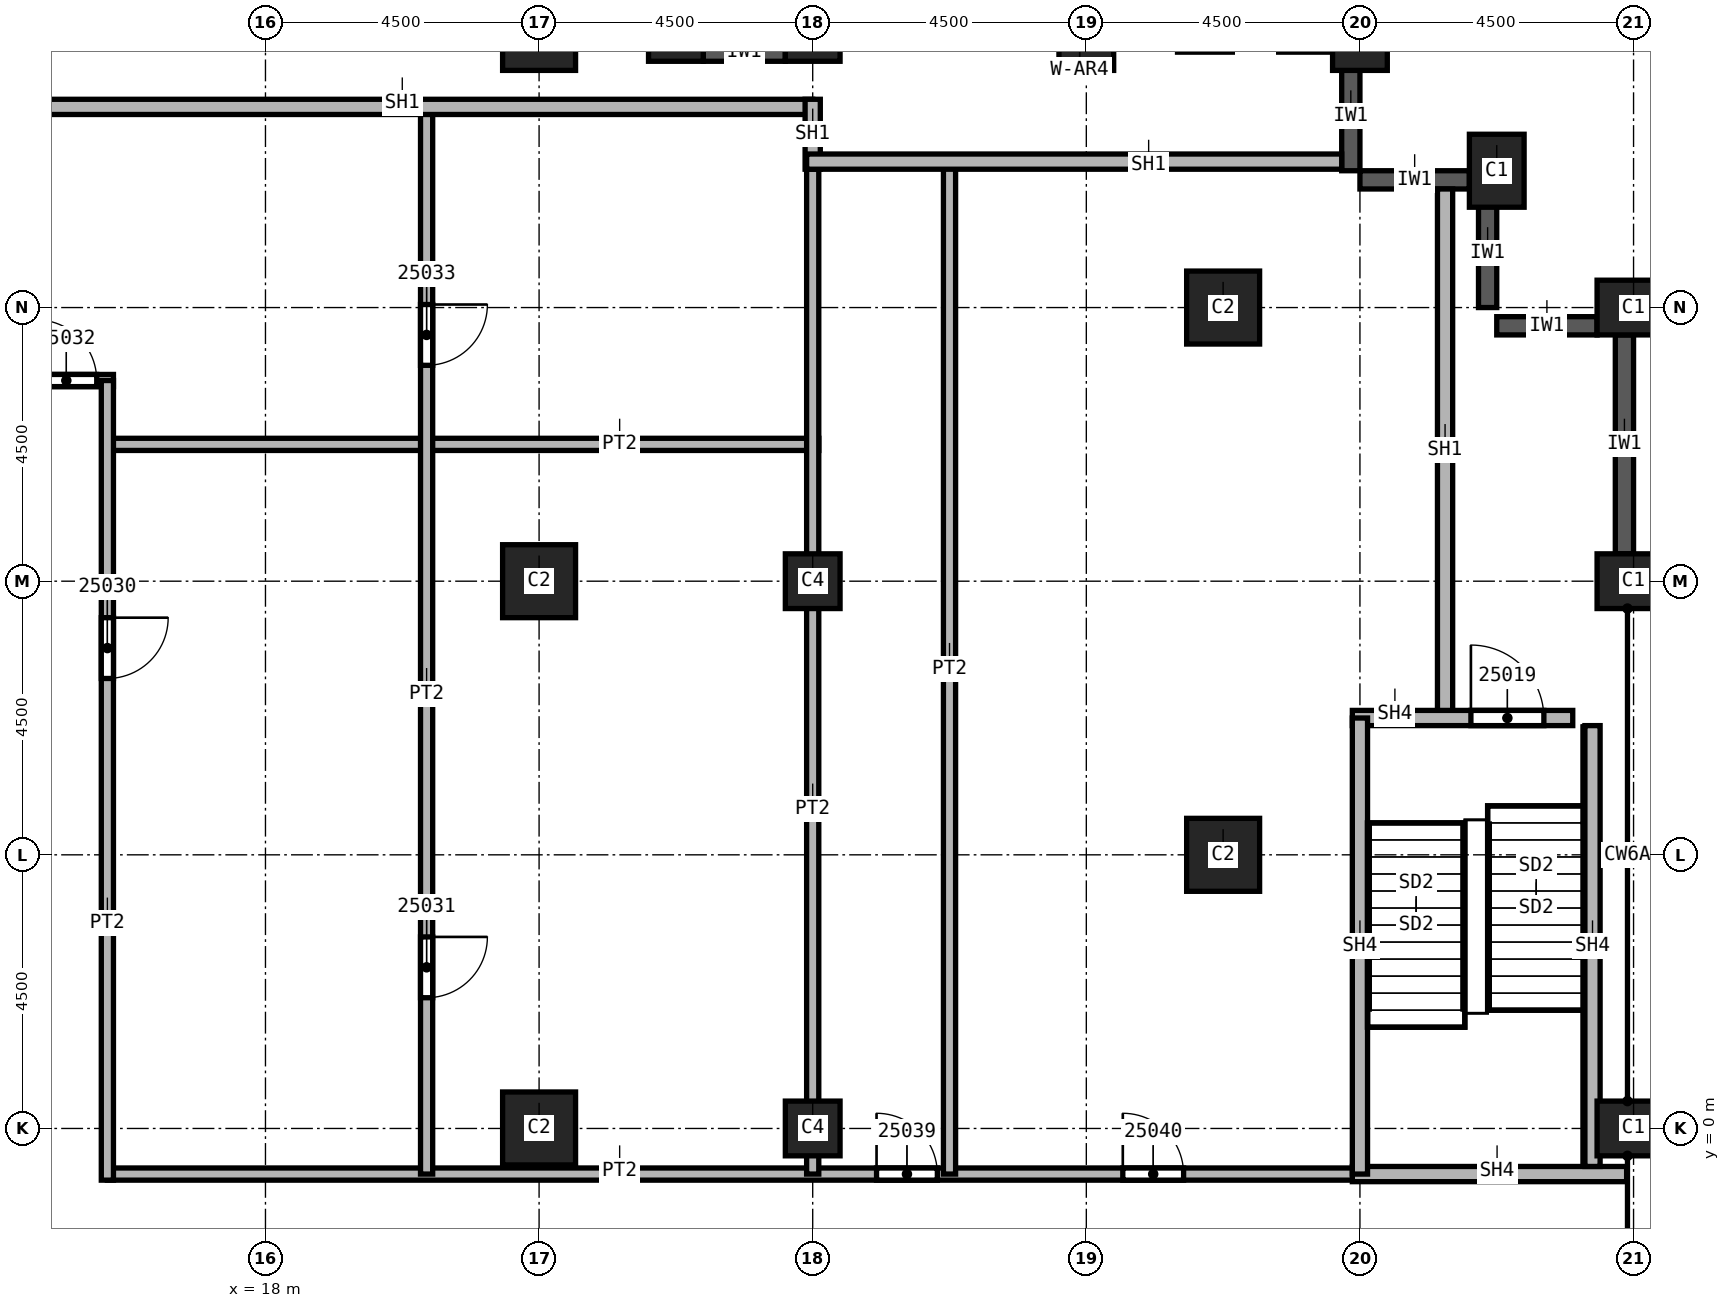
"""IFC4 building model, lengths in metres.
Left out: names, types, materials, properties, quantities, classifications, styles, units other than length and angle.
Written with IfcOpenShell. Run it as: python <this file> out.ifc"""

import sys

from ifc_helpers import new_model, si_unit, direction, frame, frame_2d, origin, origin_2d, place, context, subcontext, project, spatial, rectangle, extrude, element, fill, save


model = new_model("IFC4")
c1 = context("Model", 3, precision=1e-05, world=origin(), true_north=direction((0.0, 1.0)))
c2 = subcontext(c1, "Body", "Model", "MODEL_VIEW")
j1 = project(units=[si_unit("LENGTHUNIT", "METRE"), si_unit("PLANEANGLEUNIT", "RADIAN")], contexts=[c1])
p1 = place(None, origin())
s1 = spatial("IfcSite", under=j1, at=p1, CompositionType="ELEMENT")
p2 = place(p1, origin())
s2 = spatial("IfcBuilding", under=s1, at=p2, CompositionType="ELEMENT")
p3 = place(p2, frame((0.0, 0.0, 60.0)))
s3 = spatial("IfcBuildingStorey", under=s2, at=p3, CompositionType="ELEMENT", Elevation=60.0)
for number, where, z_axis, x_axis in (
    (1, (40.5, 0.0, 0.0), (0.0, 0.0, 1.0), (0.0, 1.0, 0.0)),
    (2, (40.5, 9.0, 0.0), (0.0, 0.0, 1.0), (0.0, 1.0, 0.0)),
    (3, (40.5, 13.5, 0.0), (0.0, 0.0, 1.0), (0.0, 1.0, 0.0)),
    (4, (38.25, 15.75, 0.0), (0.0, 0.0, 1.0), (1.0, 0.0, 0.0)),
    (5, (31.5, 18.0, 0.0), (0.0, 0.0, 1.0), (1.0, 0.0, 0.0)),
    (6, (36.0, 18.0, 0.0), (0.0, 0.0, 1.0), (1.0, 0.0, 0.0)),
):
    element("IfcColumn", number, at=place(p3, frame(where, z_axis=z_axis, x_axis=x_axis)), inside=s3, PredefinedType="COLUMN", context=c2, shape_type="SweptSolid", body=[
        extrude(rectangle(XDim=0.9, YDim=1.2, at=origin_2d()), origin(), (0.0, 0.0, 1.0), 7.7),
    ])
for number, where, z_axis, x_axis in (
    (7, (33.75, 4.5, 0.0), (0.0, 0.0, 1.0), (1.0, 0.0, 0.0)),
    (8, (33.75, 13.5, 0.0), (0.0, 0.0, 1.0), (1.0, 0.0, 0.0)),
    (9, (22.5, 0.0, 0.0), (0.0, 0.0, 1.0), (1.0, 0.0, 0.0)),
    (10, (22.5, 9.0, 0.0), (0.0, 0.0, 1.0), (1.0, 0.0, 0.0)),
    (11, (22.5, 18.0, 0.0), (0.0, 0.0, 1.0), (1.0, 0.0, 0.0)),
):
    element("IfcColumn", number, at=place(p3, frame(where, z_axis=z_axis, x_axis=x_axis)), inside=s3, PredefinedType="COLUMN", context=c2, shape_type="SweptSolid", body=[
        extrude(rectangle(XDim=1.2, YDim=1.2, at=origin_2d()), origin(), (0.0, 0.0, 1.0), 7.7),
    ])
for number, where, z_axis, x_axis in (
    (12, (27.0, 0.0, 0.0), (0.0, 0.0, 1.0), (1.0, 0.0, 0.0)),
    (13, (27.0, 9.0, 0.0), (0.0, 0.0, 1.0), (1.0, 0.0, 0.0)),
    (14, (27.0, 18.0, 0.0), (0.0, 0.0, 1.0), (1.0, 0.0, 0.0)),
    (15, (24.75, 18.0, 0.0), (0.0, 0.0, 1.0), (1.0, 0.0, 0.0)),
):
    element("IfcColumn", number, at=place(p3, frame(where, z_axis=z_axis, x_axis=x_axis)), inside=s3, PredefinedType="COLUMN", context=c2, shape_type="SweptSolid", body=[
        extrude(rectangle(XDim=0.9, YDim=0.9, at=origin_2d()), origin(), (0.0, 0.0, 1.0), 7.7),
    ])
p4 = place(p3, frame((39.9, 13.2, 0.0), z_axis=(0.0, 0.0, 1.0), x_axis=(-1.0, 0.0, 0.0)))
e16 = element("IfcWall", 16, at=p4, inside=s3, PredefinedType="SOLIDWALL", context=c2, shape_type="SweptSolid", body=[
    extrude(rectangle(XDim=1.65, YDim=0.3, at=frame_2d((0.825, 0.0))), origin(), (0.0, 0.0, 1.0), 7.1),
])
for number, where, z_axis, x_axis in (
    (17, (38.1, 15.3, 0.0), (0.0, 0.0, 1.0), (0.0, -1.0, 0.0)),
    (18, (37.8, 15.6, 0.0), (0.0, 0.0, 1.0), (-1.0, 0.0, 0.0)),
    (19, (35.85, 17.55, 0.0), (0.0, 0.0, 1.0), (0.0, -1.0, 0.0)),
):
    element("IfcWall", number, at=place(p3, frame(where, z_axis=z_axis, x_axis=x_axis)), inside=s3, PredefinedType="SOLIDWALL", context=c2, shape_type="SweptSolid", body=[
        extrude(rectangle(XDim=1.8, YDim=0.3, at=frame_2d((0.9, 0.0))), origin(), (0.0, 0.0, 1.0), 7.1),
    ])
p5 = place(p3, frame((40.35, 9.45, 0.0), z_axis=(0.0, 0.0, 1.0), x_axis=(0.0, 1.0, 0.0)))
e20 = element("IfcWall", 20, at=p5, inside=s3, PredefinedType="SOLIDWALL", context=c2, shape_type="SweptSolid", body=[
    extrude(rectangle(XDim=3.6, YDim=0.3, at=frame_2d((1.8, 0.0))), origin(), (0.0, 0.0, 1.0), 7.1),
])
p6 = place(p3, frame((26.55, 17.7, 0.0), z_axis=(0.0, 0.0, 1.0), x_axis=(-1.0, 0.0, 0.0)))
e21 = element("IfcWall", 21, at=p6, inside=s3, PredefinedType="SOLIDWALL", context=c2, shape_type="SweptSolid", body=[
    extrude(rectangle(XDim=1.35, YDim=0.3, at=frame_2d((0.675, 0.0))), origin(), (0.0, 0.0, 1.0), 7.1),
])
p7 = place(p3, frame((13.375, 12.3, 0.0), z_axis=(0.0, 0.0, 1.0), x_axis=(1.0, 0.0, 0.0)))
e22 = element("IfcWall", 22, at=p7, inside=s3, PredefinedType="PARTITIONING", context=c2, shape_type="SweptSolid", body=[
    extrude(rectangle(XDim=2.125, YDim=0.2, at=frame_2d((1.062, 0.0))), origin(), (0.0, 0.0, 1.0), 7.7),
])
p8 = place(p7, frame((0.85, 0.0, 0.0)))
e23 = element("IfcOpeningElement", 23, at=p8, cuts=e22, PredefinedType="OPENING", context=c2, shape_type="SweptSolid", body=[
    extrude(rectangle(XDim=1.0, YDim=2.1, at=frame_2d((0.5, 1.05))), frame((0.0, 0.1, 0.0), z_axis=(0.0, -1.0, 0.0), x_axis=(1.0, 0.0, 0.0)), (0.0, 0.0, 1.0), 0.2),
])
p9 = place(p3, frame((15.4, -0.75, 0.0), z_axis=(0.0, 0.0, 1.0), x_axis=(1.0, 0.0, 0.0)))
e24 = element("IfcWall", 24, at=p9, inside=s3, PredefinedType="PARTITIONING", context=c2, shape_type="SweptSolid", body=[
    extrude(rectangle(XDim=20.725, YDim=0.2, at=frame_2d((10.363, 0.0))), origin(), (0.0, 0.0, 1.0), 7.7),
])
p10 = place(p9, frame((12.65, 0.0, 0.0)))
e25 = element("IfcOpeningElement", 25, at=p10, cuts=e24, PredefinedType="OPENING", context=c2, shape_type="SweptSolid", body=[
    extrude(rectangle(XDim=1.0, YDim=2.1, at=frame_2d((0.5, 1.05))), frame((0.0, 0.1, 0.0), z_axis=(0.0, -1.0, 0.0), x_axis=(1.0, 0.0, 0.0)), (0.0, 0.0, 1.0), 0.2),
])
p11 = place(p9, frame((16.7, 0.0, 0.0)))
e26 = element("IfcOpeningElement", 26, at=p11, cuts=e24, PredefinedType="OPENING", context=c2, shape_type="SweptSolid", body=[
    extrude(rectangle(XDim=1.0, YDim=2.1, at=frame_2d((0.5, 1.05))), frame((0.0, 0.1, 0.0), z_axis=(0.0, -1.0, 0.0), x_axis=(1.0, 0.0, 0.0)), (0.0, 0.0, 1.0), 0.2),
])
p12 = place(p3, frame((15.4, 11.25, 0.0), z_axis=(0.0, 0.0, 1.0), x_axis=(1.0, 0.0, 0.0)))
e27 = element("IfcWall", 27, at=p12, inside=s3, PredefinedType="PARTITIONING", context=c2, shape_type="SweptSolid", body=[
    extrude(rectangle(XDim=11.7, YDim=0.2, at=frame_2d((5.85, 0.0))), origin(), (0.0, 0.0, 1.0), 7.7),
])
p13 = place(p3, frame((15.4, 12.3, 0.0), z_axis=(0.0, 0.0, 1.0), x_axis=(0.0, -1.0, 0.0)))
e28 = element("IfcWall", 28, at=p13, inside=s3, PredefinedType="PARTITIONING", context=c2, shape_type="SweptSolid", body=[
    extrude(rectangle(XDim=13.15, YDim=0.2, at=frame_2d((6.575, 0.0))), origin(), (0.0, 0.0, 1.0), 7.7),
])
p14 = place(p13, frame((3.9, 0.0, 0.0)))
e29 = element("IfcOpeningElement", 29, at=p14, cuts=e28, PredefinedType="OPENING", context=c2, shape_type="SweptSolid", body=[
    extrude(rectangle(XDim=1.0, YDim=2.1, at=frame_2d((0.5, 1.05))), frame((0.0, 0.1, 0.0), z_axis=(0.0, -1.0, 0.0), x_axis=(1.0, 0.0, 0.0)), (0.0, 0.0, 1.0), 0.2),
])
p15 = place(p3, frame((20.65, 16.8, 0.0), z_axis=(0.0, 0.0, 1.0), x_axis=(0.0, -1.0, 0.0)))
e30 = element("IfcWall", 30, at=p15, inside=s3, PredefinedType="PARTITIONING", context=c2, shape_type="SweptSolid", body=[
    extrude(rectangle(XDim=17.55, YDim=0.2, at=frame_2d((8.775, 0.0))), origin(), (0.0, 0.0, 1.0), 7.7),
])
p16 = place(p15, frame((13.65, 0.0, 0.0)))
e31 = element("IfcOpeningElement", 31, at=p16, cuts=e30, PredefinedType="OPENING", context=c2, shape_type="SweptSolid", body=[
    extrude(rectangle(XDim=1.0, YDim=2.1, at=frame_2d((0.5, 1.05))), frame((0.0, 0.1, 0.0), z_axis=(0.0, -1.0, 0.0), x_axis=(1.0, 0.0, 0.0)), (0.0, 0.0, 1.0), 0.2),
])
p17 = place(p15, frame((3.25, 0.0, 0.0)))
e32 = element("IfcOpeningElement", 32, at=p17, cuts=e30, PredefinedType="OPENING", context=c2, shape_type="SweptSolid", body=[
    extrude(rectangle(XDim=1.0, YDim=2.1, at=frame_2d((0.5, 1.05))), frame((0.0, 0.1, 0.0), z_axis=(0.0, -1.0, 0.0), x_axis=(1.0, 0.0, 0.0)), (0.0, 0.0, 1.0), 0.2),
])
for number, where, z_axis, x_axis in (
    (33, (27.0, 15.9, 0.0), (0.0, 0.0, 1.0), (0.0, -1.0, 0.0)),
    (34, (29.25, 15.9, 0.0), (0.0, 0.0, 1.0), (0.0, -1.0, 0.0)),
):
    element("IfcWall", number, at=place(p3, frame(where, z_axis=z_axis, x_axis=x_axis)), inside=s3, PredefinedType="PARTITIONING", context=c2, shape_type="SweptSolid", body=[
        extrude(rectangle(XDim=16.65, YDim=0.2, at=frame_2d((8.325, 0.0))), origin(), (0.0, 0.0, 1.0), 7.7),
    ])
p18 = place(p3, frame((27.0, 16.8, 0.0), z_axis=(0.0, 0.0, 1.0), x_axis=(-1.0, 0.0, 0.0)))
e35 = element("IfcWall", 35, at=p18, inside=s3, PredefinedType="SOLIDWALL", context=c2, shape_type="SweptSolid", body=[
    extrude(rectangle(XDim=13.5, YDim=0.25, at=frame_2d((6.75, 0.0))), origin(), (0.0, 0.0, 1.0), 7.7),
])
p19 = place(p3, frame((27.0, 15.775, 0.0), z_axis=(0.0, 0.0, 1.0), x_axis=(0.0, 1.0, 0.0)))
e36 = element("IfcWall", 36, at=p19, inside=s3, PredefinedType="SOLIDWALL", context=c2, shape_type="SweptSolid", body=[
    extrude(rectangle(XDim=1.15, YDim=0.25, at=frame_2d((0.575, 0.0))), origin(), (0.0, 0.0, 1.0), 7.7),
])
p20 = place(p3, frame((35.7, 15.9, 0.0), z_axis=(0.0, 0.0, 1.0), x_axis=(-1.0, 0.0, 0.0)))
e37 = element("IfcWall", 37, at=p20, inside=s3, PredefinedType="SOLIDWALL", context=c2, shape_type="SweptSolid", body=[
    extrude(rectangle(XDim=8.8, YDim=0.25, at=frame_2d((4.4, 0.0))), origin(), (0.0, 0.0, 1.0), 7.7),
])
p21 = place(p3, frame((37.4, 6.75, 0.0), z_axis=(0.0, 0.0, 1.0), x_axis=(0.0, 1.0, 0.0)))
e38 = element("IfcWall", 38, at=p21, inside=s3, PredefinedType="SOLIDWALL", context=c2, shape_type="SweptSolid", body=[
    extrude(rectangle(XDim=8.7, YDim=0.25, at=frame_2d((4.35, 0.0))), origin(), (0.0, 0.0, 1.0), 7.7),
])
p22 = place(p3, frame((35.875, -0.75, 0.0), z_axis=(0.0, 0.0, 1.0), x_axis=(1.0, 0.0, 0.0)))
e39 = element("IfcWall", 39, at=p22, inside=s3, PredefinedType="SOLIDWALL", context=c2, shape_type="SweptSolid", body=[
    extrude(rectangle(XDim=4.511, YDim=0.25, at=frame_2d((2.255, 0.0))), origin(), (0.0, 0.0, 1.0), 7.7),
])
p23 = place(p3, frame((35.875, 6.75, 0.0), z_axis=(0.0, 0.0, 1.0), x_axis=(1.0, 0.0, 0.0)))
e40 = element("IfcWall", 40, at=p23, inside=s3, PredefinedType="SOLIDWALL", context=c2, shape_type="SweptSolid", body=[
    extrude(rectangle(XDim=3.625, YDim=0.25, at=frame_2d((1.812, 0.0))), origin(), (0.0, 0.0, 1.0), 7.7),
])
p24 = place(p23, frame((1.95, 0.0, 0.0)))
e41 = element("IfcOpeningElement", 41, at=p24, cuts=e40, PredefinedType="OPENING", context=c2, shape_type="SweptSolid", body=[
    extrude(rectangle(XDim=1.2, YDim=2.1, at=frame_2d((0.6, 1.05))), frame((0.0, 0.125, 0.0), z_axis=(0.0, -1.0, 0.0), x_axis=(1.0, 0.0, 0.0)), (0.0, 0.0, 1.0), 0.25),
])
p25 = place(p3, frame((36.0, -0.75, 0.0), z_axis=(0.0, 0.0, 1.0), x_axis=(0.0, 1.0, 0.0)))
e42 = element("IfcWall", 42, at=p25, inside=s3, PredefinedType="SOLIDWALL", context=c2, shape_type="SweptSolid", body=[
    extrude(rectangle(XDim=7.5, YDim=0.25, at=frame_2d((3.75, 0.0))), origin(), (0.0, 0.0, 1.0), 7.7),
])
p26 = place(p3, frame((39.825, -0.625, 0.0), z_axis=(0.0, 0.0, 1.0), x_axis=(0.0, 1.0, 0.0)))
e43 = element("IfcWall", 43, at=p26, inside=s3, PredefinedType="SOLIDWALL", context=c2, shape_type="SweptSolid", body=[
    extrude(rectangle(XDim=7.25, YDim=0.25, at=frame_2d((3.625, 0.0))), origin(), (0.0, 0.0, 1.0), 7.7),
])
p27 = place(p24, origin())
e44 = element("IfcDoor", 44, at=p27, inside=s3, OperationType="SINGLE_SWING_RIGHT", PredefinedType="DOOR", context=c2, shape_type="SweptSolid", body=[
    extrude(rectangle(XDim=1.2, YDim=2.1, at=frame_2d((0.6, 1.05))), frame((0.0, 0.025, 0.0), z_axis=(0.0, -1.0, 0.0), x_axis=(1.0, 0.0, 0.0)), (0.0, 0.0, 1.0), 0.05),
])
fill(e41, e44)
p28 = place(p14, origin())
e45 = element("IfcDoor", 45, at=p28, inside=s3, OperationType="SINGLE_SWING_LEFT", PredefinedType="DOOR", context=c2, shape_type="SweptSolid", body=[
    extrude(rectangle(XDim=1.0, YDim=2.1, at=frame_2d((0.5, 1.05))), frame((0.0, 0.025, 0.0), z_axis=(0.0, -1.0, 0.0), x_axis=(1.0, 0.0, 0.0)), (0.0, 0.0, 1.0), 0.05),
])
fill(e29, e45)
p29 = place(p16, origin())
e46 = element("IfcDoor", 46, at=p29, inside=s3, OperationType="SINGLE_SWING_RIGHT", PredefinedType="DOOR", context=c2, shape_type="SweptSolid", body=[
    extrude(rectangle(XDim=1.0, YDim=2.1, at=frame_2d((0.5, 1.05))), frame((0.0, 0.025, 0.0), z_axis=(0.0, -1.0, 0.0), x_axis=(1.0, 0.0, 0.0)), (0.0, 0.0, 1.0), 0.05),
])
fill(e31, e46)
p30 = place(p8, origin())
e47 = element("IfcDoor", 47, at=p30, inside=s3, OperationType="SINGLE_SWING_LEFT", PredefinedType="DOOR", context=c2, shape_type="SweptSolid", body=[
    extrude(rectangle(XDim=1.0, YDim=2.1, at=frame_2d((0.5, 1.05))), frame((0.0, 0.025, 0.0), z_axis=(0.0, -1.0, 0.0), x_axis=(1.0, 0.0, 0.0)), (0.0, 0.0, 1.0), 0.05),
])
fill(e23, e47)
p31 = place(p17, origin())
e48 = element("IfcDoor", 48, at=p31, inside=s3, OperationType="SINGLE_SWING_RIGHT", PredefinedType="DOOR", context=c2, shape_type="SweptSolid", body=[
    extrude(rectangle(XDim=1.0, YDim=2.1, at=frame_2d((0.5, 1.05))), frame((0.0, 0.025, 0.0), z_axis=(0.0, -1.0, 0.0), x_axis=(1.0, 0.0, 0.0)), (0.0, 0.0, 1.0), 0.05),
])
fill(e32, e48)
p32 = place(p10, origin())
e49 = element("IfcDoor", 49, at=p32, inside=s3, OperationType="SINGLE_SWING_RIGHT", PredefinedType="DOOR", context=c2, shape_type="SweptSolid", body=[
    extrude(rectangle(XDim=1.0, YDim=2.1, at=frame_2d((0.5, 1.05))), frame((0.0, 0.025, 0.0), z_axis=(0.0, -1.0, 0.0), x_axis=(1.0, 0.0, 0.0)), (0.0, 0.0, 1.0), 0.05),
])
fill(e25, e49)
p33 = place(p11, origin())
e50 = element("IfcDoor", 50, at=p33, inside=s3, OperationType="SINGLE_SWING_LEFT", PredefinedType="DOOR", context=c2, shape_type="SweptSolid", body=[
    extrude(rectangle(XDim=1.0, YDim=2.1, at=frame_2d((0.5, 1.05))), frame((0.0, 0.025, 0.0), z_axis=(0.0, -1.0, 0.0), x_axis=(1.0, 0.0, 0.0)), (0.0, 0.0, 1.0), 0.05),
])
fill(e26, e50)
save(model, sys.argv[1])
